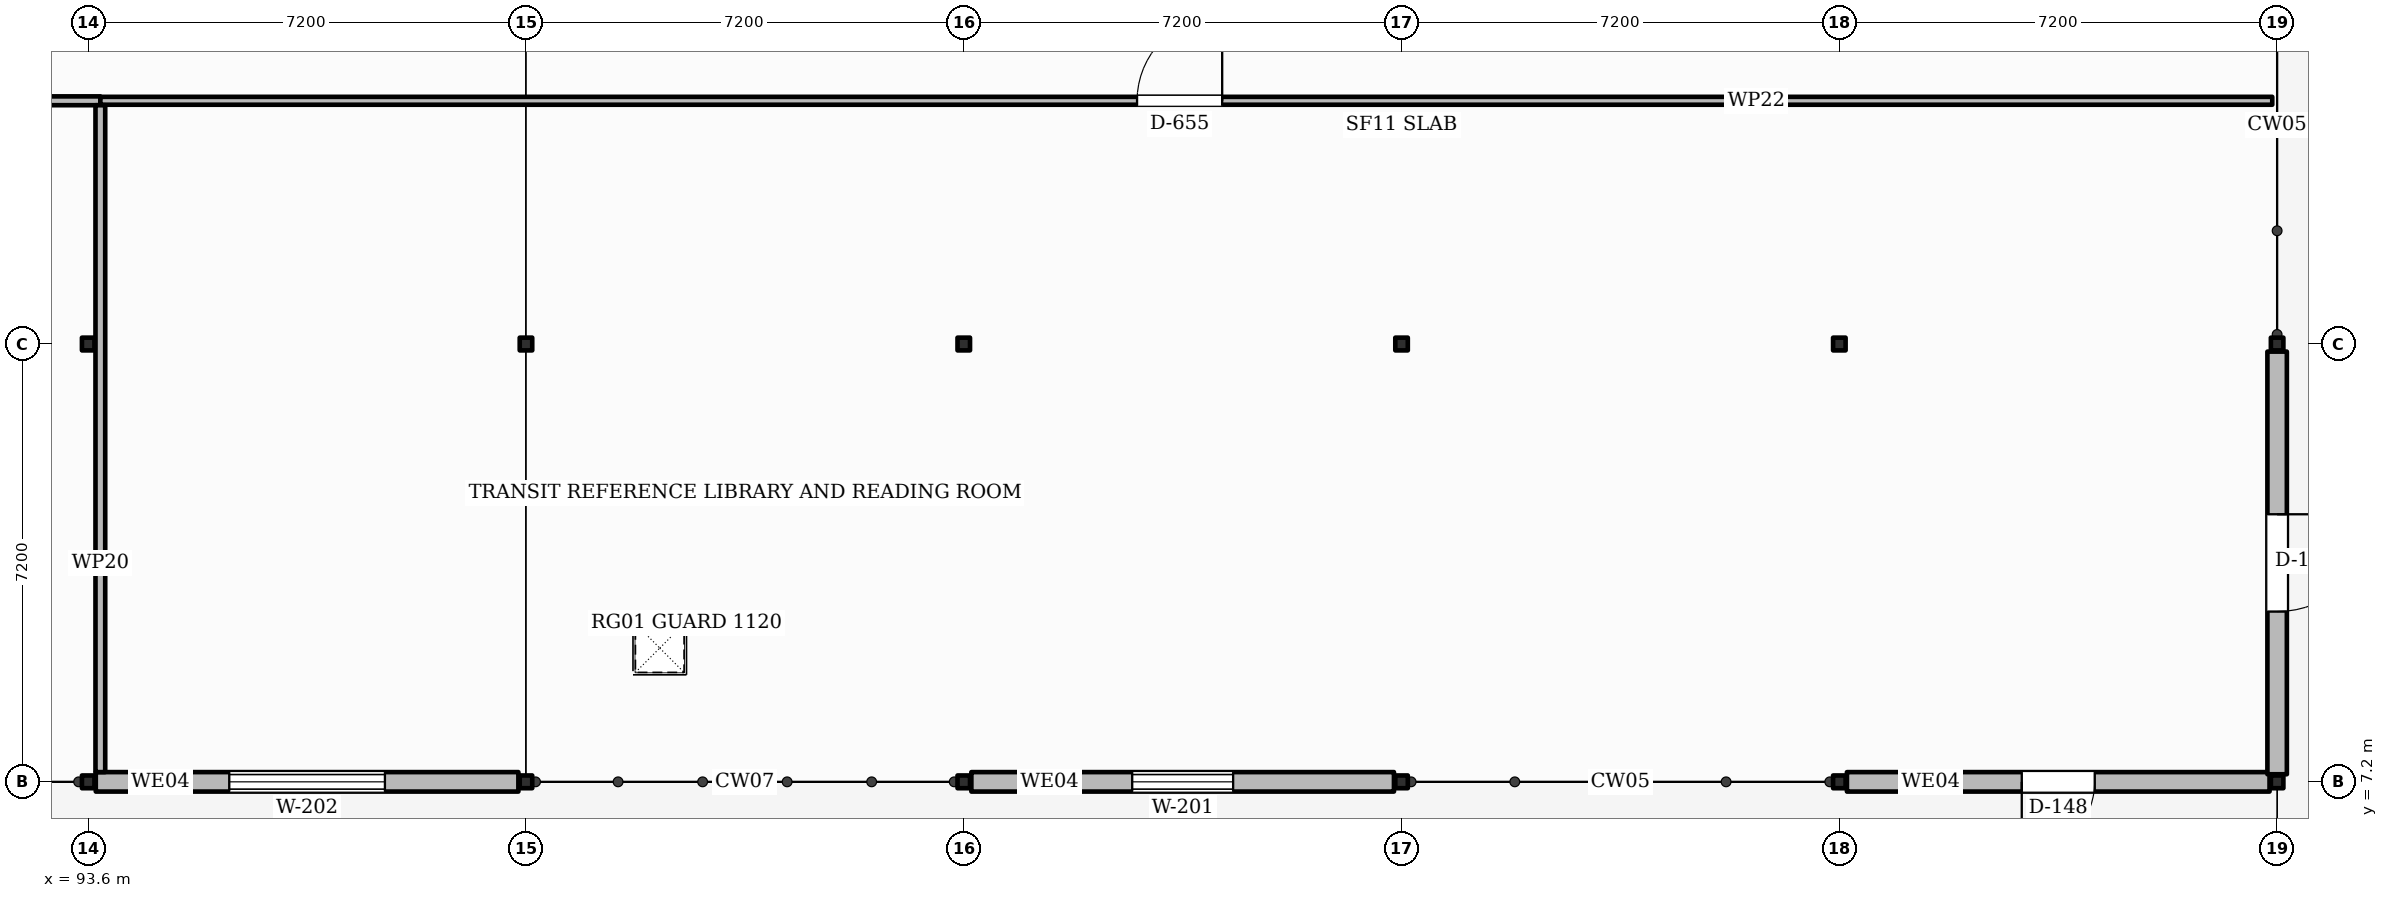
"""IFC4 building model, lengths in metres.
Left out: names, types, materials, properties, quantities, classifications, styles, units other than length and angle.
Written with IfcOpenShell. Run it as: python <this file> out.ifc"""

import sys

from ifc_helpers import new_model, si_unit, direction, frame, frame_2d, origin, origin_2d, place, context, subcontext, project, spatial, rectangle, i_section, extrude, element, fill, save


model = new_model("IFC4")
c1 = context("Model", 3, precision=1e-05, world=origin(), true_north=direction((0.0, 1.0)))
c2 = subcontext(c1, "Body", "Model", "MODEL_VIEW")
j1 = project(units=[si_unit("LENGTHUNIT", "METRE"), si_unit("PLANEANGLEUNIT", "RADIAN")], contexts=[c1])
p1 = place(None, origin())
s1 = spatial("IfcSite", under=j1, at=p1, CompositionType="ELEMENT")
p2 = place(p1, origin())
s2 = spatial("IfcBuilding", under=s1, at=p2, CompositionType="ELEMENT")
p3 = place(p2, frame((0.0, 0.0, 9.9)))
s3 = spatial("IfcBuildingStorey", under=s2, at=p3, CompositionType="ELEMENT", Elevation=9.9)
for number, where, z_axis, x_axis in (
    (1, (93.6, 7.2, 0.0), (0.0, 0.0, 1.0), (1.0, 0.0, 0.0)),
    (2, (93.6, 14.4, 0.0), (0.0, 0.0, 1.0), (1.0, 0.0, 0.0)),
    (3, (100.8, 7.2, 0.0), (0.0, 0.0, 1.0), (1.0, 0.0, 0.0)),
    (4, (100.8, 14.4, 0.0), (0.0, 0.0, 1.0), (1.0, 0.0, 0.0)),
    (5, (108.0, 7.2, 0.0), (0.0, 0.0, 1.0), (1.0, 0.0, 0.0)),
    (6, (108.0, 14.4, 0.0), (0.0, 0.0, 1.0), (1.0, 0.0, 0.0)),
    (7, (115.2, 7.2, 0.0), (0.0, 0.0, 1.0), (1.0, 0.0, 0.0)),
    (8, (115.2, 14.4, 0.0), (0.0, 0.0, 1.0), (1.0, 0.0, 0.0)),
    (9, (122.4, 7.2, 0.0), (0.0, 0.0, 1.0), (1.0, 0.0, 0.0)),
    (10, (122.4, 14.4, 0.0), (0.0, 0.0, 1.0), (1.0, 0.0, 0.0)),
    (11, (129.6, 7.2, 0.0), (0.0, 0.0, 1.0), (1.0, 0.0, 0.0)),
    (12, (129.6, 14.4, 0.0), (0.0, 0.0, 1.0), (1.0, 0.0, 0.0)),
):
    element("IfcColumn", number, at=place(p3, frame(where, z_axis=z_axis, x_axis=x_axis)), inside=s3, PredefinedType="COLUMN", context=c2, shape_type="SweptSolid", body=[
        extrude(i_section(OverallWidth=0.206, OverallDepth=0.21, WebThickness=0.01, FlangeThickness=0.014, FilletRadius=0.01, at=origin_2d()), origin(), (0.0, 0.0, 1.0), 4.5),
    ])
p4 = place(p3, frame((129.475, 7.2, 0.0), z_axis=(0.0, 0.0, 1.0), x_axis=(-1.0, 0.0, 0.0)))
e13 = element("IfcWall", 13, at=p4, inside=s3, PredefinedType="SOLIDWALL", context=c2, shape_type="SweptSolid", body=[
    extrude(rectangle(XDim=6.95, YDim=0.32, at=frame_2d((3.475, 0.0))), origin(), (0.0, 0.0, 1.0), 3.8),
])
p5 = place(p4, frame((2.875, 0.0, 0.0)))
e14 = element("IfcOpeningElement", 14, at=p5, cuts=e13, PredefinedType="OPENING", context=c2, shape_type="SweptSolid", body=[
    extrude(rectangle(XDim=1.2, YDim=2.15, at=frame_2d((0.6, 1.075))), frame((0.0, 0.17, 0.0), z_axis=(0.0, -1.0, 0.0), x_axis=(1.0, 0.0, 0.0)), (0.0, 0.0, 1.0), 0.34),
])
p6 = place(p3, frame((115.075, 7.2, 0.0), z_axis=(0.0, 0.0, 1.0), x_axis=(-1.0, 0.0, 0.0)))
e15 = element("IfcWall", 15, at=p6, inside=s3, PredefinedType="SOLIDWALL", context=c2, shape_type="SweptSolid", body=[
    extrude(rectangle(XDim=6.95, YDim=0.32, at=frame_2d((3.475, 0.0))), origin(), (0.0, 0.0, 1.0), 3.8),
])
p7 = place(p6, frame((2.645, 0.0, 1.05)))
e16 = element("IfcOpeningElement", 16, at=p7, cuts=e15, PredefinedType="OPENING", context=c2, shape_type="SweptSolid", body=[
    extrude(rectangle(XDim=1.66, YDim=1.8, at=frame_2d((0.83, 0.9))), frame((0.0, 0.17, 0.0), z_axis=(0.0, -1.0, 0.0), x_axis=(1.0, 0.0, 0.0)), (0.0, 0.0, 1.0), 0.34),
])
p8 = place(p3, frame((100.675, 7.2, 0.0), z_axis=(0.0, 0.0, 1.0), x_axis=(-1.0, 0.0, 0.0)))
e17 = element("IfcWall", 17, at=p8, inside=s3, PredefinedType="SOLIDWALL", context=c2, shape_type="SweptSolid", body=[
    extrude(rectangle(XDim=6.95, YDim=0.32, at=frame_2d((3.475, 0.0))), origin(), (0.0, 0.0, 1.0), 3.8),
])
p9 = place(p8, frame((2.195, 0.0, 1.05)))
e18 = element("IfcOpeningElement", 18, at=p9, cuts=e17, PredefinedType="OPENING", context=c2, shape_type="SweptSolid", body=[
    extrude(rectangle(XDim=2.56, YDim=1.55, at=frame_2d((1.28, 0.775))), frame((0.0, 0.17, 0.0), z_axis=(0.0, -1.0, 0.0), x_axis=(1.0, 0.0, 0.0)), (0.0, 0.0, 1.0), 0.34),
])
p10 = place(p3, frame((129.6, 14.275, 0.0), z_axis=(0.0, 0.0, 1.0), x_axis=(0.0, -1.0, 0.0)))
e19 = element("IfcWall", 19, at=p10, inside=s3, PredefinedType="SOLIDWALL", context=c2, shape_type="SweptSolid", body=[
    extrude(rectangle(XDim=6.95, YDim=0.32, at=frame_2d((3.475, 0.0))), origin(), (0.0, 0.0, 1.0), 3.8),
])
p11 = place(p10, frame((2.675, 0.0, 0.0)))
e20 = element("IfcOpeningElement", 20, at=p11, cuts=e19, PredefinedType="OPENING", context=c2, shape_type="SweptSolid", body=[
    extrude(rectangle(XDim=1.6, YDim=2.2, at=frame_2d((0.8, 1.1))), frame((0.0, 0.17, 0.0), z_axis=(0.0, -1.0, 0.0), x_axis=(1.0, 0.0, 0.0)), (0.0, 0.0, 1.0), 0.34),
])
p12 = place(p3, frame((57.68, 18.4, 0.0), z_axis=(0.0, 0.0, 1.0), x_axis=(1.0, 0.0, 0.0)))
e21 = element("IfcWall", 21, at=p12, inside=s3, PredefinedType="PARTITIONING", context=c2, shape_type="SweptSolid", body=[
    extrude(rectangle(XDim=36.12, YDim=0.145, at=frame_2d((18.06, 0.0))), origin(), (0.0, 0.0, 1.0), 3.55),
])
p13 = place(p12, frame((17.42, 0.0, 0.0)))
e22 = element("IfcOpeningElement", 22, at=p13, cuts=e21, PredefinedType="OPENING", context=c2, shape_type="SweptSolid", body=[
    extrude(rectangle(XDim=1.4, YDim=2.15, at=frame_2d((0.7, 1.075))), frame((0.0, 0.083, 0.0), z_axis=(0.0, -1.0, 0.0), x_axis=(1.0, 0.0, 0.0)), (0.0, 0.0, 1.0), 0.165),
])
p14 = place(p3, frame((93.8, 18.4, 0.0), z_axis=(0.0, 0.0, 1.0), x_axis=(1.0, 0.0, 0.0)))
e23 = element("IfcWall", 23, at=p14, inside=s3, PredefinedType="PARTITIONING", context=c2, shape_type="SweptSolid", body=[
    extrude(rectangle(XDim=35.72, YDim=0.13, at=frame_2d((17.86, 0.0))), origin(), (0.0, 0.0, 1.0), 3.55),
])
p15 = place(p14, frame((17.05, 0.0, 0.0)))
e24 = element("IfcOpeningElement", 24, at=p15, cuts=e23, PredefinedType="OPENING", context=c2, shape_type="SweptSolid", body=[
    extrude(rectangle(XDim=1.4, YDim=2.15, at=frame_2d((0.7, 1.075))), frame((0.0, 0.075, 0.0), z_axis=(0.0, -1.0, 0.0), x_axis=(1.0, 0.0, 0.0)), (0.0, 0.0, 1.0), 0.15),
])
p16 = place(p3, frame((93.8, 7.36, 0.0), z_axis=(0.0, 0.0, 1.0), x_axis=(0.0, 1.0, 0.0)))
e25 = element("IfcWall", 25, at=p16, inside=s3, PredefinedType="PARTITIONING", context=c2, shape_type="SweptSolid", body=[
    extrude(rectangle(XDim=10.967, YDim=0.16, at=frame_2d((5.483, 0.0))), origin(), (0.0, 0.0, 1.0), 3.55),
])
p17 = place(p7, origin())
e26 = element("IfcWindow", 26, at=p17, inside=s3, PartitioningType="SINGLE_PANEL", PredefinedType="WINDOW", context=c2, shape_type="SweptSolid", body=[
    extrude(rectangle(XDim=1.66, YDim=1.8, at=frame_2d((0.83, 0.9))), frame((0.0, 0.03, 0.0), z_axis=(0.0, -1.0, 0.0), x_axis=(1.0, 0.0, 0.0)), (0.0, 0.0, 1.0), 0.06),
])
fill(e16, e26)
p18 = place(p9, origin())
e27 = element("IfcWindow", 27, at=p18, inside=s3, PartitioningType="SINGLE_PANEL", PredefinedType="WINDOW", context=c2, shape_type="SweptSolid", body=[
    extrude(rectangle(XDim=2.56, YDim=1.55, at=frame_2d((1.28, 0.775))), frame((0.0, 0.03, 0.0), z_axis=(0.0, -1.0, 0.0), x_axis=(1.0, 0.0, 0.0)), (0.0, 0.0, 1.0), 0.06),
])
fill(e18, e27)
p19 = place(p11, origin())
e28 = element("IfcDoor", 28, at=p19, inside=s3, OperationType="SINGLE_SWING_LEFT", PredefinedType="DOOR", context=c2, shape_type="SweptSolid", body=[
    extrude(rectangle(XDim=1.6, YDim=2.2, at=frame_2d((0.8, 1.1))), frame((0.0, 0.025, 0.0), z_axis=(0.0, -1.0, 0.0), x_axis=(1.0, 0.0, 0.0)), (0.0, 0.0, 1.0), 0.05),
])
fill(e20, e28)
p20 = place(p5, origin())
e29 = element("IfcDoor", 29, at=p20, inside=s3, OperationType="SINGLE_SWING_RIGHT", PredefinedType="DOOR", context=c2, shape_type="SweptSolid", body=[
    extrude(rectangle(XDim=1.2, YDim=2.15, at=frame_2d((0.6, 1.075))), frame((0.0, 0.025, 0.0), z_axis=(0.0, -1.0, 0.0), x_axis=(1.0, 0.0, 0.0)), (0.0, 0.0, 1.0), 0.05),
])
fill(e14, e29)
p21 = place(p15, origin())
e30 = element("IfcDoor", 30, at=p21, inside=s3, OperationType="SINGLE_SWING_RIGHT", PredefinedType="DOOR", context=c2, shape_type="SweptSolid", body=[
    extrude(rectangle(XDim=1.4, YDim=2.15, at=frame_2d((0.7, 1.075))), frame((0.0, 0.025, 0.0), z_axis=(0.0, -1.0, 0.0), x_axis=(1.0, 0.0, 0.0)), (0.0, 0.0, 1.0), 0.05),
])
fill(e24, e30)
save(model, sys.argv[1])
